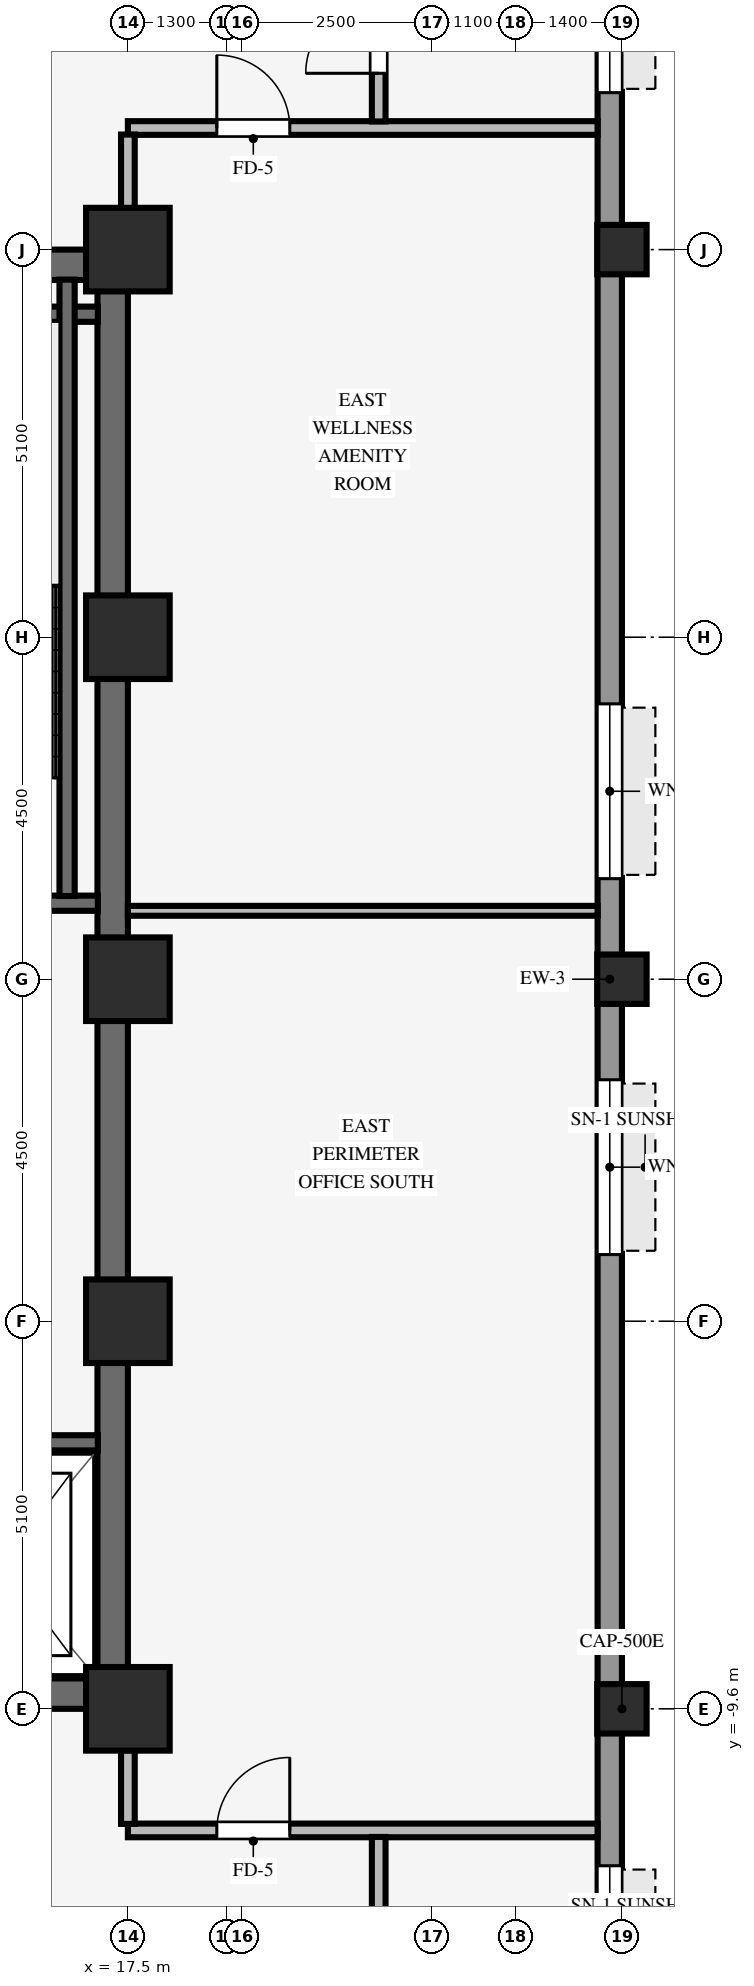
"""IFC4 building model, lengths in metres.
Left out: names, types, materials, properties, quantities, classifications, styles, units other than length and angle.
Written with IfcOpenShell. Run it as: python <this file> out.ifc"""

import sys

from ifc_helpers import new_model, si_unit, direction, frame, frame_2d, origin, origin_2d, place, context, subcontext, project, spatial, rectangle, hollow_rectangle, extrude, source, transform, mapped, element, fill, save


model = new_model("IFC4")
c1 = context("Model", 3, precision=1e-05, world=origin(), true_north=direction((0.0, 1.0)))
c2 = subcontext(c1, "Body", "Model", "MODEL_VIEW")
j1 = project(units=[si_unit("LENGTHUNIT", "METRE"), si_unit("PLANEANGLEUNIT", "RADIAN")], contexts=[c1])
p1 = place(None, origin())
s1 = spatial("IfcSite", under=j1, at=p1, CompositionType="ELEMENT")
p2 = place(p1, origin())
s2 = spatial("IfcBuilding", under=s1, at=p2, CompositionType="ELEMENT")
p3 = place(p2, frame((0.0, 0.0, 112.9)))
s3 = spatial("IfcBuildingStorey", under=s2, at=p3, CompositionType="ELEMENT", Elevation=112.9)
for number, where, z_axis, x_axis in (
    (1, (9.0, -9.4, 0.0), (0.0, 0.0, 1.0), (1.0, 0.0, 0.0)),
    (2, (9.0, 9.4, 0.0), (0.0, 0.0, 1.0), (1.0, 0.0, 0.0)),
):
    element("IfcWall", number, at=place(p3, frame(where, z_axis=z_axis, x_axis=x_axis)), inside=s3, PredefinedType="SHEAR", context=c2, shape_type="SweptSolid", body=[
        extrude(rectangle(XDim=8.5, YDim=0.4, at=frame_2d((4.25, 0.0))), origin(), (0.0, 0.0, 1.0), 3.25),
    ])
p4 = place(p3, frame((17.3, -9.205, 0.0), z_axis=(0.0, 0.0, 1.0), x_axis=(0.0, 1.0, 0.0)))
e3 = element("IfcWall", 3, at=p4, inside=s3, PredefinedType="SHEAR", context=c2, shape_type="SweptSolid", body=[
    extrude(rectangle(XDim=18.41, YDim=0.4, at=frame_2d((9.205, 0.0))), origin(), (0.0, 0.0, 1.0), 3.25),
])
for number, where, z_axis, x_axis in (
    (4, (17.5, -9.6, 0.0), (0.0, 0.0, 1.0), (1.0, 0.0, 0.0)),
    (5, (17.5, -4.5, 0.0), (0.0, 0.0, 1.0), (1.0, 0.0, 0.0)),
    (6, (17.5, 4.5, 0.0), (0.0, 0.0, 1.0), (1.0, 0.0, 0.0)),
    (7, (17.5, 9.6, 0.0), (0.0, 0.0, 1.0), (1.0, 0.0, 0.0)),
    (8, (17.5, 0.0, 0.0), (0.0, 0.0, 1.0), (1.0, 0.0, 0.0)),
):
    element("IfcColumn", number, at=place(p3, frame(where, z_axis=z_axis, x_axis=x_axis)), inside=s3, PredefinedType="COLUMN", context=c2, shape_type="SweptSolid", body=[
        extrude(rectangle(XDim=1.1, YDim=1.1, at=origin_2d()), origin(), (0.0, 0.0, 1.0), 3.25),
    ])
for number, where, z_axis, x_axis in (
    (9, (24.0, -9.6, 0.0), (0.0, 0.0, 1.0), (1.0, 0.0, 0.0)),
    (10, (24.0, 0.0, 0.0), (0.0, 0.0, 1.0), (1.0, 0.0, 0.0)),
    (11, (24.0, 9.6, 0.0), (0.0, 0.0, 1.0), (1.0, 0.0, 0.0)),
):
    element("IfcColumn", number, at=place(p3, frame(where, z_axis=z_axis, x_axis=x_axis)), inside=s3, PredefinedType="COLUMN", context=c2, shape_type="SweptSolid", body=[
        extrude(hollow_rectangle(XDim=0.65, YDim=0.65, WallThickness=0.04, InnerFilletRadius=0.04, OuterFilletRadius=0.08, at=origin_2d()), origin(), (0.0, 0.0, 1.0), 3.25),
    ])
p5 = place(p3, frame((23.84, -20.784, 0.0), z_axis=(0.0, 0.0, 1.0), x_axis=(0.0, 1.0, 0.0)))
e12 = element("IfcWall", 12, at=p5, inside=s3, PredefinedType="STANDARD", context=c2, shape_type="SweptSolid", body=[
    extrude(rectangle(XDim=41.568, YDim=0.32, at=frame_2d((20.784, 0.0))), origin(), (0.0, 0.0, 1.0), 3.24),
])
p6 = place(p5, frame((6.819, 0.0, 0.8)))
e13 = element("IfcOpeningElement", 13, at=p6, cuts=e12, PredefinedType="OPENING", context=c2, shape_type="SweptSolid", body=[
    extrude(rectangle(XDim=2.3, YDim=1.62, at=frame_2d((1.15, 0.81))), frame((0.0, 0.17, 0.0), z_axis=(0.0, -1.0, 0.0), x_axis=(1.0, 0.0, 0.0)), (0.0, 0.0, 1.0), 0.34),
])
p7 = place(p5, frame((17.161, 0.0, 0.8)))
e14 = element("IfcOpeningElement", 14, at=p7, cuts=e12, PredefinedType="OPENING", context=c2, shape_type="SweptSolid", body=[
    extrude(rectangle(XDim=2.3, YDim=1.62, at=frame_2d((1.15, 0.81))), frame((0.0, 0.17, 0.0), z_axis=(0.0, -1.0, 0.0), x_axis=(1.0, 0.0, 0.0)), (0.0, 0.0, 1.0), 0.34),
])
p8 = place(p5, frame((22.107, 0.0, 0.8)))
e15 = element("IfcOpeningElement", 15, at=p8, cuts=e12, PredefinedType="OPENING", context=c2, shape_type="SweptSolid", body=[
    extrude(rectangle(XDim=2.3, YDim=1.62, at=frame_2d((1.15, 0.81))), frame((0.0, 0.17, 0.0), z_axis=(0.0, -1.0, 0.0), x_axis=(1.0, 0.0, 0.0)), (0.0, 0.0, 1.0), 0.34),
])
p9 = place(p5, frame((32.449, 0.0, 0.8)))
e16 = element("IfcOpeningElement", 16, at=p9, cuts=e12, PredefinedType="OPENING", context=c2, shape_type="SweptSolid", body=[
    extrude(rectangle(XDim=2.3, YDim=1.62, at=frame_2d((1.15, 0.81))), frame((0.0, 0.17, 0.0), z_axis=(0.0, -1.0, 0.0), x_axis=(1.0, 0.0, 0.0)), (0.0, 0.0, 1.0), 0.34),
])
for number, where, z_axis, x_axis in (
    (17, (13.535, 1.0, 0.0), (0.0, 0.0, 1.0), (1.0, 0.0, 0.0)),
    (18, (13.535, 8.75, 0.0), (0.0, 0.0, 1.0), (1.0, 0.0, 0.0)),
):
    element("IfcWall", number, at=place(p3, frame(where, z_axis=z_axis, x_axis=x_axis)), inside=s3, PredefinedType="SHEAR", context=c2, shape_type="SweptSolid", body=[
        extrude(rectangle(XDim=3.57, YDim=0.2, at=frame_2d((1.785, 0.0))), origin(), (0.0, 0.0, 1.0), 3.25),
    ])
p10 = place(p3, frame((16.7, 1.095, 0.0), z_axis=(0.0, 0.0, 1.0), x_axis=(0.0, 1.0, 0.0)))
e19 = element("IfcWall", 19, at=p10, inside=s3, PredefinedType="SHEAR", context=c2, shape_type="SweptSolid", body=[
    extrude(rectangle(XDim=8.11, YDim=0.2, at=frame_2d((4.055, 0.0))), origin(), (0.0, 0.0, 1.0), 3.25),
])
p11 = place(p3, frame((14.645, -6.1, 0.0), z_axis=(0.0, 0.0, 1.0), x_axis=(1.0, 0.0, 0.0)))
e20 = element("IfcWall", 20, at=p11, inside=s3, PredefinedType="SHEAR", context=c2, shape_type="SweptSolid", body=[
    extrude(rectangle(XDim=2.46, YDim=0.2, at=frame_2d((1.23, 0.0))), origin(), (0.0, 0.0, 1.0), 3.25),
])
p12 = place(p3, frame((17.5, -11.2, 0.0), z_axis=(0.0, 0.0, 1.0), x_axis=(1.0, 0.0, 0.0)))
e21 = element("IfcWall", 21, at=p12, inside=s3, PredefinedType="PARTITIONING", context=c2, shape_type="SweptSolid", body=[
    extrude(rectangle(XDim=6.18, YDim=0.18, at=frame_2d((3.09, 0.0))), origin(), (0.0, 0.0, 1.0), 3.24),
])
p13 = place(p12, frame((1.17, 0.0, 0.0)))
e22 = element("IfcOpeningElement", 22, at=p13, cuts=e21, PredefinedType="OPENING", context=c2, shape_type="SweptSolid", body=[
    extrude(rectangle(XDim=0.96, YDim=2.1, at=frame_2d((0.48, 1.05))), frame((0.0, 0.1, 0.0), z_axis=(0.0, -1.0, 0.0), x_axis=(1.0, 0.0, 0.0)), (0.0, 0.0, 1.0), 0.2),
])
p14 = place(p3, frame((17.5, 0.9, 0.0), z_axis=(0.0, 0.0, 1.0), x_axis=(1.0, 0.0, 0.0)))
e23 = element("IfcWall", 23, at=p14, inside=s3, PredefinedType="PARTITIONING", context=c2, shape_type="SweptSolid", body=[
    extrude(rectangle(XDim=6.18, YDim=0.13, at=frame_2d((3.09, 0.0))), origin(), (0.0, 0.0, 1.0), 3.24),
])
p15 = place(p3, frame((17.5, 11.2, 0.0), z_axis=(0.0, 0.0, 1.0), x_axis=(1.0, 0.0, 0.0)))
e24 = element("IfcWall", 24, at=p15, inside=s3, PredefinedType="PARTITIONING", context=c2, shape_type="SweptSolid", body=[
    extrude(rectangle(XDim=6.18, YDim=0.18, at=frame_2d((3.09, 0.0))), origin(), (0.0, 0.0, 1.0), 3.24),
])
p16 = place(p15, frame((1.17, 0.0, 0.0)))
e25 = element("IfcOpeningElement", 25, at=p16, cuts=e24, PredefinedType="OPENING", context=c2, shape_type="SweptSolid", body=[
    extrude(rectangle(XDim=0.96, YDim=2.1, at=frame_2d((0.48, 1.05))), frame((0.0, 0.1, 0.0), z_axis=(0.0, -1.0, 0.0), x_axis=(1.0, 0.0, 0.0)), (0.0, 0.0, 1.0), 0.2),
])
for number, where, z_axis, x_axis in (
    (26, (17.5, -11.114, 0.0), (0.0, 0.0, 1.0), (0.0, 1.0, 0.0)),
    (27, (17.5, 10.146, 0.0), (0.0, 0.0, 1.0), (0.0, 1.0, 0.0)),
):
    element("IfcWall", number, at=place(p3, frame(where, z_axis=z_axis, x_axis=x_axis)), inside=s3, PredefinedType="PARTITIONING", context=c2, shape_type="SweptSolid", body=[
        extrude(rectangle(XDim=0.968, YDim=0.18, at=frame_2d((0.484, 0.0))), origin(), (0.0, 0.0, 1.0), 2.618),
    ])
p17 = place(p3, frame((20.8, -13.514, 0.0), z_axis=(0.0, 0.0, 1.0), x_axis=(0.0, 1.0, 0.0)))
e28 = element("IfcWall", 28, at=p17, inside=s3, PredefinedType="PARTITIONING", context=c2, shape_type="SweptSolid", body=[
    extrude(rectangle(XDim=2.228, YDim=0.18, at=frame_2d((1.114, 0.0))), origin(), (0.0, 0.0, 1.0), 3.24),
])
p18 = place(p3, frame((20.8, 11.286, 0.0), z_axis=(0.0, 0.0, 1.0), x_axis=(0.0, 1.0, 0.0)))
e29 = element("IfcWall", 29, at=p18, inside=s3, PredefinedType="PARTITIONING", context=c2, shape_type="SweptSolid", body=[
    extrude(rectangle(XDim=2.228, YDim=0.18, at=frame_2d((1.114, 0.0))), origin(), (0.0, 0.0, 1.0), 3.24),
])
p19 = place(p18, frame((0.634, 0.0, 0.0)))
e30 = element("IfcOpeningElement", 30, at=p19, cuts=e29, PredefinedType="OPENING", context=c2, shape_type="SweptSolid", body=[
    extrude(rectangle(XDim=0.96, YDim=2.1, at=frame_2d((0.48, 1.05))), frame((0.0, 0.1, 0.0), z_axis=(0.0, -1.0, 0.0), x_axis=(1.0, 0.0, 0.0)), (0.0, 0.0, 1.0), 0.2),
])
m1 = source(origin(), c2, "Body", "SweptSolid", [
    extrude(rectangle(XDim=2.3, YDim=1.62, at=frame_2d((1.15, 0.81))), frame((0.0, 0.03, 0.0), z_axis=(0.0, -1.0, 0.0), x_axis=(1.0, 0.0, 0.0)), (0.0, 0.0, 1.0), 0.06),
])
p20 = place(p6, origin())
e31 = element("IfcWindow", 31, at=p20, inside=s3, PartitioningType="SINGLE_PANEL", PredefinedType="WINDOW", context=c2, shape_type="MappedRepresentation", body=[
    mapped(m1, transform((0.0, 0.0, 0.0), scale=1.0)),
])
fill(e13, e31)
p21 = place(p7, origin())
e32 = element("IfcWindow", 32, at=p21, inside=s3, PartitioningType="SINGLE_PANEL", PredefinedType="WINDOW", context=c2, shape_type="MappedRepresentation", body=[
    mapped(m1, transform((0.0, 0.0, 0.0), scale=1.0)),
])
fill(e14, e32)
p22 = place(p8, origin())
e33 = element("IfcWindow", 33, at=p22, inside=s3, PartitioningType="SINGLE_PANEL", PredefinedType="WINDOW", context=c2, shape_type="MappedRepresentation", body=[
    mapped(m1, transform((0.0, 0.0, 0.0), scale=1.0)),
])
fill(e15, e33)
p23 = place(p9, origin())
e34 = element("IfcWindow", 34, at=p23, inside=s3, PartitioningType="SINGLE_PANEL", PredefinedType="WINDOW", context=c2, shape_type="MappedRepresentation", body=[
    mapped(m1, transform((0.0, 0.0, 0.0), scale=1.0)),
])
fill(e16, e34)
m2 = source(origin(), c2, "Body", "SweptSolid", [
    extrude(rectangle(XDim=0.96, YDim=2.1, at=frame_2d((0.48, 1.05))), frame((0.0, 0.025, 0.0), z_axis=(0.0, -1.0, 0.0), x_axis=(1.0, 0.0, 0.0)), (0.0, 0.0, 1.0), 0.05),
])
p24 = place(p13, origin())
e35 = element("IfcDoor", 35, at=p24, inside=s3, OperationType="SINGLE_SWING_RIGHT", PredefinedType="DOOR", context=c2, shape_type="MappedRepresentation", body=[
    mapped(m2, transform((0.0, 0.0, 0.0), scale=1.0)),
])
fill(e22, e35)
p25 = place(p16, origin())
e36 = element("IfcDoor", 36, at=p25, inside=s3, OperationType="SINGLE_SWING_LEFT", PredefinedType="DOOR", context=c2, shape_type="MappedRepresentation", body=[
    mapped(m2, transform((0.0, 0.0, 0.0), scale=1.0)),
])
fill(e25, e36)
p26 = place(p19, origin())
e37 = element("IfcDoor", 37, at=p26, inside=s3, OperationType="SINGLE_SWING_LEFT", PredefinedType="DOOR", context=c2, shape_type="MappedRepresentation", body=[
    mapped(m2, transform((0.0, 0.0, 0.0), scale=1.0)),
])
fill(e30, e37)
save(model, sys.argv[1])
